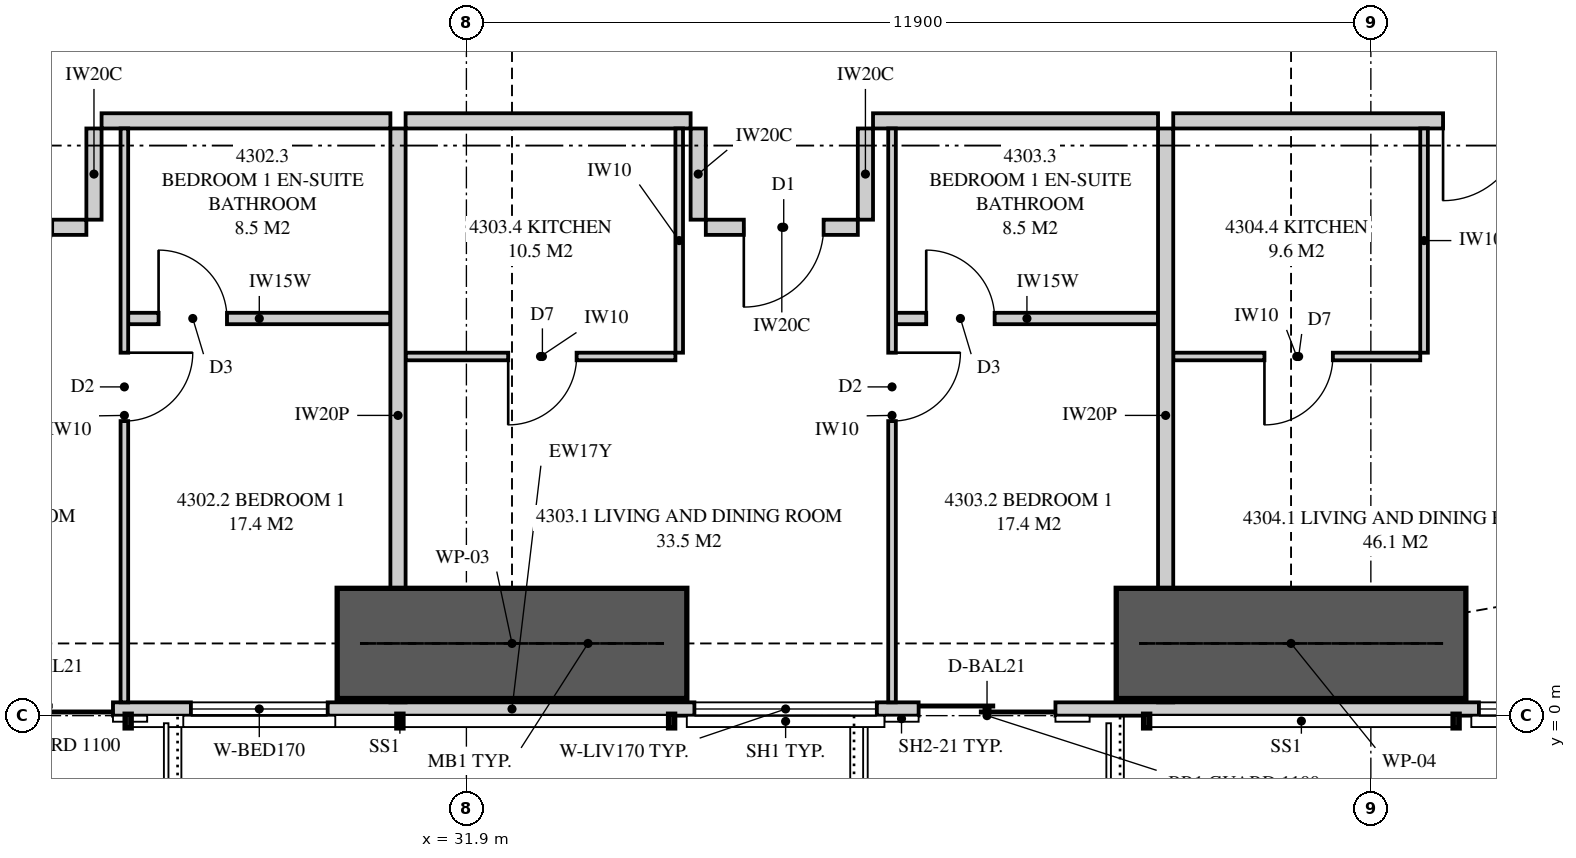
"""IFC4 building model, lengths in metres.
Left out: names, types, materials, properties, quantities, classifications, styles, units other than length and angle.
Written with IfcOpenShell. Run it as: python <this file> out.ifc"""

import sys

from ifc_helpers import new_model, si_unit, direction, frame, frame_2d, origin, place, context, subcontext, project, spatial, polyline, rectangle, outline, extrude, element, fill, save


model = new_model("IFC4")
c1 = context("Model", 3, precision=1e-05, world=origin(), true_north=direction((0.0, 1.0)))
c2 = subcontext(c1, "Body", "Model", "MODEL_VIEW")
j1 = project(units=[si_unit("LENGTHUNIT", "METRE"), si_unit("PLANEANGLEUNIT", "RADIAN")], contexts=[c1])
p1 = place(None, origin())
s1 = spatial("IfcSite", under=j1, at=p1, CompositionType="ELEMENT")
p2 = place(p1, origin())
s2 = spatial("IfcBuilding", under=s1, at=p2, CompositionType="ELEMENT")
p3 = place(p2, frame((0.0, 0.0, 161.05)))
s3 = spatial("IfcBuildingStorey", under=s2, at=p3, CompositionType="ELEMENT", Elevation=161.05)
p4 = place(p3, frame((15.051, 0.087, 0.0), z_axis=(0.0, 0.0, 1.0), x_axis=(1.0, 0.0, 0.0)))
e1 = element("IfcWall", 1, at=p4, inside=s3, PredefinedType="SOLIDWALL", context=c2, shape_type="SweptSolid", body=[
    extrude(outline(polyline([(0.0, 0.0), (34.897, 0.0), (34.897, 3.11), (27.91, 3.11), (27.91, 2.15), (27.836, 2.15), (27.836, 3.11), (27.699, 3.11), (27.699, 2.15), (7.199, 2.15), (7.199, 3.11), (7.062, 3.11), (7.062, 2.15), (6.987, 2.15), (6.987, 3.11), (0.0, 3.11), (0.0, 0.0)])), frame((0.0, 0.087, 0.0), z_axis=(0.0, -1.0, 0.0), x_axis=(1.0, 0.0, 0.0)), (0.0, 0.0, 1.0), 0.175),
])
p5 = place(p4, frame((1.625, 0.0, 0.4)))
e2 = element("IfcOpeningElement", 2, at=p5, cuts=e1, PredefinedType="OPENING", context=c2, shape_type="SweptSolid", body=[
    extrude(rectangle(XDim=2.4, YDim=1.7, at=frame_2d((1.2, 0.85))), frame((0.0, 0.097, 0.0), z_axis=(0.0, -1.0, 0.0), x_axis=(1.0, 0.0, 0.0)), (0.0, 0.0, 1.0), 0.195),
])
p6 = place(p4, frame((10.399, 0.0, 0.0)))
e3 = element("IfcOpeningElement", 3, at=p6, cuts=e1, PredefinedType="OPENING", context=c2, shape_type="SweptSolid", body=[
    extrude(rectangle(XDim=1.8, YDim=2.1, at=frame_2d((0.9, 1.05))), frame((0.0, 0.097, 0.0), z_axis=(0.0, -1.0, 0.0), x_axis=(1.0, 0.0, 0.0)), (0.0, 0.0, 1.0), 0.195),
])
p7 = place(p4, frame((13.224, 0.0, 0.4)))
e4 = element("IfcOpeningElement", 4, at=p7, cuts=e1, PredefinedType="OPENING", context=c2, shape_type="SweptSolid", body=[
    extrude(rectangle(XDim=1.8, YDim=1.7, at=frame_2d((0.9, 0.85))), frame((0.0, 0.097, 0.0), z_axis=(0.0, -1.0, 0.0), x_axis=(1.0, 0.0, 0.0)), (0.0, 0.0, 1.0), 0.195),
])
p8 = place(p4, frame((19.849, 0.0, 0.4)))
e5 = element("IfcOpeningElement", 5, at=p8, cuts=e1, PredefinedType="OPENING", context=c2, shape_type="SweptSolid", body=[
    extrude(rectangle(XDim=2.4, YDim=1.7, at=frame_2d((1.2, 0.85))), frame((0.0, 0.097, 0.0), z_axis=(0.0, -1.0, 0.0), x_axis=(1.0, 0.0, 0.0)), (0.0, 0.0, 1.0), 0.195),
])
p9 = place(p4, frame((22.799, 0.0, 0.0)))
e6 = element("IfcOpeningElement", 6, at=p9, cuts=e1, PredefinedType="OPENING", context=c2, shape_type="SweptSolid", body=[
    extrude(rectangle(XDim=1.8, YDim=2.1, at=frame_2d((0.9, 1.05))), frame((0.0, 0.097, 0.0), z_axis=(0.0, -1.0, 0.0), x_axis=(1.0, 0.0, 0.0)), (0.0, 0.0, 1.0), 0.195),
])
p10 = place(p4, frame((30.17, 0.0, 0.4)))
e7 = element("IfcOpeningElement", 7, at=p10, cuts=e1, PredefinedType="OPENING", context=c2, shape_type="SweptSolid", body=[
    extrude(rectangle(XDim=2.4, YDim=1.7, at=frame_2d((1.2, 0.85))), frame((0.0, 0.097, 0.0), z_axis=(0.0, -1.0, 0.0), x_axis=(1.0, 0.0, 0.0)), (0.0, 0.0, 1.0), 0.195),
])
p11 = place(p3, frame((31.0, 0.175, 0.0), z_axis=(0.0, 0.0, 1.0), x_axis=(0.0, 1.0, 0.0)))
e8 = element("IfcWall", 8, at=p11, inside=s3, PredefinedType="PARTITIONING", context=c2, shape_type="SweptSolid", body=[
    extrude(outline(polyline([(0.529, 2.15), (0.0, 2.15), (0.0, 0.0), (0.529, 0.0), (0.529, 0.29), (1.021, 0.29), (1.021, 0.0), (7.55, 0.0), (7.55, 3.11), (1.685, 3.11), (1.685, 2.15), (1.021, 2.15), (1.021, 1.86), (0.529, 1.86), (0.529, 2.15)])), frame((0.0, 0.1, 0.0), z_axis=(0.0, -1.0, 0.0), x_axis=(1.0, 0.0, 0.0)), (0.0, 0.0, 1.0), 0.2),
])
p12 = place(p3, frame((27.4, 0.175, 0.0), z_axis=(0.0, 0.0, 1.0), x_axis=(0.0, 1.0, 0.0)))
e9 = element("IfcWall", 9, at=p12, inside=s3, PredefinedType="PARTITIONING", context=c2, shape_type="SweptSolid", body=[
    extrude(outline(polyline([(0.0, 0.0), (7.55, 0.0), (7.55, 3.11), (1.635, 3.11), (1.635, 2.15), (0.0, 2.15), (0.0, 3.11), (0.0, 0.0)])), frame((0.0, 0.05, 0.0), z_axis=(0.0, -1.0, 0.0), x_axis=(1.0, 0.0, 0.0)), (0.0, 0.0, 1.0), 0.1),
])
p13 = place(p12, frame((3.7, 0.0, 0.0)))
e10 = element("IfcOpeningElement", 10, at=p13, cuts=e9, PredefinedType="OPENING", context=c2, shape_type="SweptSolid", body=[
    extrude(rectangle(XDim=0.9, YDim=2.1, at=frame_2d((0.45, 1.05))), frame((0.0, 0.06, 0.0), z_axis=(0.0, -1.0, 0.0), x_axis=(1.0, 0.0, 0.0)), (0.0, 0.0, 1.0), 0.12),
])
p14 = place(p3, frame((27.45, 5.225, 0.0), z_axis=(0.0, 0.0, 1.0), x_axis=(1.0, 0.0, 0.0)))
e11 = element("IfcWall", 11, at=p14, inside=s3, PredefinedType="PLUMBINGWALL", context=c2, shape_type="SweptSolid", body=[
    extrude(rectangle(XDim=3.45, YDim=0.15, at=frame_2d((1.725, 0.0))), origin(), (0.0, 0.0, 1.0), 3.11),
])
p15 = place(p14, frame((0.4, 0.0, 0.0)))
e12 = element("IfcOpeningElement", 12, at=p15, cuts=e11, PredefinedType="OPENING", context=c2, shape_type="SweptSolid", body=[
    extrude(rectangle(XDim=0.9, YDim=2.1, at=frame_2d((0.45, 1.05))), frame((0.0, 0.085, 0.0), z_axis=(0.0, -1.0, 0.0), x_axis=(1.0, 0.0, 0.0)), (0.0, 0.0, 1.0), 0.17),
])
p16 = place(p3, frame((41.1, 0.175, 0.0), z_axis=(0.0, 0.0, 1.0), x_axis=(0.0, 1.0, 0.0)))
e13 = element("IfcWall", 13, at=p16, inside=s3, PredefinedType="PARTITIONING", context=c2, shape_type="SweptSolid", body=[
    extrude(outline(polyline([(0.529, 2.15), (0.0, 2.15), (0.0, 0.0), (0.529, 0.0), (0.529, 0.165), (1.021, 0.165), (1.021, 0.0), (7.55, 0.0), (7.55, 3.11), (1.685, 3.11), (1.685, 2.15), (1.021, 2.15), (1.021, 1.985), (0.529, 1.985), (0.529, 2.15)])), frame((0.0, 0.1, 0.0), z_axis=(0.0, -1.0, 0.0), x_axis=(1.0, 0.0, 0.0)), (0.0, 0.0, 1.0), 0.2),
])
p17 = place(p3, frame((31.1, 7.825, 0.0), z_axis=(0.0, 0.0, 1.0), x_axis=(1.0, 0.0, 0.0)))
e14 = element("IfcWall", 14, at=p17, inside=s3, PredefinedType="PARTITIONING", context=c2, shape_type="SweptSolid", body=[
    extrude(outline(polyline([(0.0, 0.0), (3.75, 0.0), (3.75, 3.11), (1.737, 3.11), (1.737, 2.541), (1.062, 2.541), (1.062, 3.11), (0.0, 3.11), (0.0, 0.0)])), frame((0.0, 0.1, 0.0), z_axis=(0.0, -1.0, 0.0), x_axis=(1.0, 0.0, 0.0)), (0.0, 0.0, 1.0), 0.2),
])
p18 = place(p3, frame((37.5, 0.175, 0.0), z_axis=(0.0, 0.0, 1.0), x_axis=(0.0, 1.0, 0.0)))
e15 = element("IfcWall", 15, at=p18, inside=s3, PredefinedType="PARTITIONING", context=c2, shape_type="SweptSolid", body=[
    extrude(outline(polyline([(0.0, 0.0), (7.55, 0.0), (7.55, 3.11), (1.635, 3.11), (1.635, 2.15), (0.0, 2.15), (0.0, 3.11), (0.0, 0.0)])), frame((0.0, 0.05, 0.0), z_axis=(0.0, -1.0, 0.0), x_axis=(1.0, 0.0, 0.0)), (0.0, 0.0, 1.0), 0.1),
])
p19 = place(p18, frame((3.7, 0.0, 0.0)))
e16 = element("IfcOpeningElement", 16, at=p19, cuts=e15, PredefinedType="OPENING", context=c2, shape_type="SweptSolid", body=[
    extrude(rectangle(XDim=0.9, YDim=2.1, at=frame_2d((0.45, 1.05))), frame((0.0, 0.06, 0.0), z_axis=(0.0, -1.0, 0.0), x_axis=(1.0, 0.0, 0.0)), (0.0, 0.0, 1.0), 0.12),
])
p20 = place(p3, frame((37.55, 5.225, 0.0), z_axis=(0.0, 0.0, 1.0), x_axis=(1.0, 0.0, 0.0)))
e17 = element("IfcWall", 17, at=p20, inside=s3, PredefinedType="PLUMBINGWALL", context=c2, shape_type="SweptSolid", body=[
    extrude(rectangle(XDim=3.45, YDim=0.15, at=frame_2d((1.725, 0.0))), origin(), (0.0, 0.0, 1.0), 3.11),
])
p21 = place(p20, frame((0.4, 0.0, 0.0)))
e18 = element("IfcOpeningElement", 18, at=p21, cuts=e17, PredefinedType="OPENING", context=c2, shape_type="SweptSolid", body=[
    extrude(rectangle(XDim=0.9, YDim=2.1, at=frame_2d((0.45, 1.05))), frame((0.0, 0.085, 0.0), z_axis=(0.0, -1.0, 0.0), x_axis=(1.0, 0.0, 0.0)), (0.0, 0.0, 1.0), 0.17),
])
p22 = place(p3, frame((31.1, 4.725, 0.0), z_axis=(0.0, 0.0, 1.0), x_axis=(1.0, 0.0, 0.0)))
e19 = element("IfcWall", 19, at=p22, inside=s3, PredefinedType="PARTITIONING", context=c2, shape_type="SweptSolid", body=[
    extrude(outline(polyline([(0.0, 0.0), (3.55, 0.0), (3.55, 3.11), (1.688, 3.11), (1.688, 2.541), (1.113, 2.541), (1.113, 3.11), (0.0, 3.11), (0.0, 0.0)])), frame((0.0, 0.05, 0.0), z_axis=(0.0, -1.0, 0.0), x_axis=(1.0, 0.0, 0.0)), (0.0, 0.0, 1.0), 0.1),
])
p23 = place(p22, frame((1.35, 0.0, 0.0)))
e20 = element("IfcOpeningElement", 20, at=p23, cuts=e19, PredefinedType="OPENING", context=c2, shape_type="SweptSolid", body=[
    extrude(rectangle(XDim=0.9, YDim=2.1, at=frame_2d((0.45, 1.05))), frame((0.0, 0.06, 0.0), z_axis=(0.0, -1.0, 0.0), x_axis=(1.0, 0.0, 0.0)), (0.0, 0.0, 1.0), 0.12),
])
p24 = place(p3, frame((34.7, 4.775, 0.0), z_axis=(0.0, 0.0, 1.0), x_axis=(0.0, 1.0, 0.0)))
e21 = element("IfcWall", 21, at=p24, inside=s3, PredefinedType="PARTITIONING", context=c2, shape_type="SweptSolid", body=[
    extrude(rectangle(XDim=2.95, YDim=0.1, at=frame_2d((1.475, 0.0))), origin(), (0.0, 0.0, 1.0), 3.11),
])
p25 = place(p3, frame((41.2, 7.825, 0.0), z_axis=(0.0, 0.0, 1.0), x_axis=(1.0, 0.0, 0.0)))
e22 = element("IfcWall", 22, at=p25, inside=s3, PredefinedType="PARTITIONING", context=c2, shape_type="SweptSolid", body=[
    extrude(outline(polyline([(0.0, 0.0), (4.75, 0.0), (4.75, 3.11), (1.887, 3.11), (1.887, 2.541), (1.213, 2.541), (1.213, 3.11), (0.0, 3.11), (0.0, 0.0)])), frame((0.0, 0.1, 0.0), z_axis=(0.0, -1.0, 0.0), x_axis=(1.0, 0.0, 0.0)), (0.0, 0.0, 1.0), 0.2),
])
p26 = place(p25, frame((3.55, 0.0, 0.0)))
e23 = element("IfcOpeningElement", 23, at=p26, cuts=e22, PredefinedType="OPENING", context=c2, shape_type="SweptSolid", body=[
    extrude(rectangle(XDim=1.05, YDim=2.2, at=frame_2d((0.525, 1.1))), frame((0.0, 0.11, 0.0), z_axis=(0.0, -1.0, 0.0), x_axis=(1.0, 0.0, 0.0)), (0.0, 0.0, 1.0), 0.22),
])
p27 = place(p3, frame((41.2, 4.725, 0.0), z_axis=(0.0, 0.0, 1.0), x_axis=(1.0, 0.0, 0.0)))
e24 = element("IfcWall", 24, at=p27, inside=s3, PredefinedType="PARTITIONING", context=c2, shape_type="SweptSolid", body=[
    extrude(outline(polyline([(0.0, 0.0), (3.25, 0.0), (3.25, 3.11), (1.837, 3.11), (1.837, 2.541), (1.263, 2.541), (1.263, 3.11), (0.0, 3.11), (0.0, 0.0)])), frame((0.0, 0.05, 0.0), z_axis=(0.0, -1.0, 0.0), x_axis=(1.0, 0.0, 0.0)), (0.0, 0.0, 1.0), 0.1),
])
p28 = place(p27, frame((1.2, 0.0, 0.0)))
e25 = element("IfcOpeningElement", 25, at=p28, cuts=e24, PredefinedType="OPENING", context=c2, shape_type="SweptSolid", body=[
    extrude(rectangle(XDim=0.9, YDim=2.1, at=frame_2d((0.45, 1.05))), frame((0.0, 0.06, 0.0), z_axis=(0.0, -1.0, 0.0), x_axis=(1.0, 0.0, 0.0)), (0.0, 0.0, 1.0), 0.12),
])
p29 = place(p3, frame((44.5, 4.775, 0.0), z_axis=(0.0, 0.0, 1.0), x_axis=(0.0, 1.0, 0.0)))
e26 = element("IfcWall", 26, at=p29, inside=s3, PredefinedType="PARTITIONING", context=c2, shape_type="SweptSolid", body=[
    extrude(rectangle(XDim=2.95, YDim=0.1, at=frame_2d((1.475, 0.0))), origin(), (0.0, 0.0, 1.0), 3.11),
])
p30 = place(p3, frame((27.1, 7.825, 0.0), z_axis=(0.0, 0.0, 1.0), x_axis=(1.0, 0.0, 0.0)))
e27 = element("IfcWall", 27, at=p30, inside=s3, PredefinedType="PARTITIONING", context=c2, shape_type="SweptSolid", body=[
    extrude(rectangle(XDim=3.8, YDim=0.2, at=frame_2d((1.9, 0.0))), origin(), (0.0, 0.0, 1.0), 3.11),
])
p31 = place(p3, frame((24.9, 6.425, 0.0), z_axis=(0.0, 0.0, 1.0), x_axis=(1.0, 0.0, 0.0)))
e28 = element("IfcWall", 28, at=p31, inside=s3, PredefinedType="PARTITIONING", context=c2, shape_type="SweptSolid", body=[
    extrude(rectangle(XDim=2.0, YDim=0.2, at=frame_2d((1.0, 0.0))), origin(), (0.0, 0.0, 1.0), 3.11),
])
p32 = place(p31, frame((0.5, 0.0, 0.0)))
e29 = element("IfcOpeningElement", 29, at=p32, cuts=e28, PredefinedType="OPENING", context=c2, shape_type="SweptSolid", body=[
    extrude(rectangle(XDim=1.05, YDim=2.2, at=frame_2d((0.525, 1.1))), frame((0.0, 0.11, 0.0), z_axis=(0.0, -1.0, 0.0), x_axis=(1.0, 0.0, 0.0)), (0.0, 0.0, 1.0), 0.22),
])
p33 = place(p3, frame((27.0, 7.725, 0.0), z_axis=(0.0, 0.0, 1.0), x_axis=(0.0, -1.0, 0.0)))
e30 = element("IfcWall", 30, at=p33, inside=s3, PredefinedType="PARTITIONING", context=c2, shape_type="SweptSolid", body=[
    extrude(rectangle(XDim=1.2, YDim=0.2, at=frame_2d((0.6, 0.0))), origin(), (0.0, 0.0, 1.0), 3.11),
])
p34 = place(p3, frame((37.25, 7.825, 0.0), z_axis=(0.0, 0.0, 1.0), x_axis=(1.0, 0.0, 0.0)))
e31 = element("IfcWall", 31, at=p34, inside=s3, PredefinedType="PARTITIONING", context=c2, shape_type="SweptSolid", body=[
    extrude(rectangle(XDim=3.75, YDim=0.2, at=frame_2d((1.875, 0.0))), origin(), (0.0, 0.0, 1.0), 3.11),
])
p35 = place(p3, frame((35.05, 6.425, 0.0), z_axis=(0.0, 0.0, 1.0), x_axis=(1.0, 0.0, 0.0)))
e32 = element("IfcWall", 32, at=p35, inside=s3, PredefinedType="PARTITIONING", context=c2, shape_type="SweptSolid", body=[
    extrude(rectangle(XDim=2.0, YDim=0.2, at=frame_2d((1.0, 0.0))), origin(), (0.0, 0.0, 1.0), 3.11),
])
p36 = place(p35, frame((0.5, 0.0, 0.0)))
e33 = element("IfcOpeningElement", 33, at=p36, cuts=e32, PredefinedType="OPENING", context=c2, shape_type="SweptSolid", body=[
    extrude(rectangle(XDim=1.05, YDim=2.2, at=frame_2d((0.525, 1.1))), frame((0.0, 0.11, 0.0), z_axis=(0.0, -1.0, 0.0), x_axis=(1.0, 0.0, 0.0)), (0.0, 0.0, 1.0), 0.22),
])
for number, where, z_axis, x_axis in (
    (34, (34.95, 7.725, 0.0), (0.0, 0.0, 1.0), (0.0, -1.0, 0.0)),
    (35, (37.15, 7.725, 0.0), (0.0, 0.0, 1.0), (0.0, -1.0, 0.0)),
):
    element("IfcWall", number, at=place(p3, frame(where, z_axis=z_axis, x_axis=x_axis)), inside=s3, PredefinedType="PARTITIONING", context=c2, shape_type="SweptSolid", body=[
        extrude(rectangle(XDim=1.2, YDim=0.2, at=frame_2d((0.6, 0.0))), origin(), (0.0, 0.0, 1.0), 3.11),
    ])
for number, where, z_axis, x_axis in (
    (36, (30.2, 0.95, 0.0), (0.0, 0.0, 1.0), (1.0, 0.0, 0.0)),
    (37, (40.45, 0.95, 0.0), (0.0, 0.0, 1.0), (1.0, 0.0, 0.0)),
):
    element("IfcWall", number, at=place(p3, frame(where, z_axis=z_axis, x_axis=x_axis)), inside=s3, PredefinedType="SHEAR", context=c2, shape_type="SweptSolid", body=[
        extrude(rectangle(XDim=4.6, YDim=1.45, at=frame_2d((2.3, 0.0))), origin(), (0.0, 0.0, 1.0), 3.35),
    ])
p37 = place(p6, origin())
e38 = element("IfcDoor", 38, at=p37, inside=s3, OperationType="SLIDING_TO_LEFT", PredefinedType="DOOR", context=c2, shape_type="SweptSolid", body=[
    extrude(rectangle(XDim=1.8, YDim=2.1, at=frame_2d((0.9, 1.05))), frame((0.0, 0.025, 0.0), z_axis=(0.0, -1.0, 0.0), x_axis=(1.0, 0.0, 0.0)), (0.0, 0.0, 1.0), 0.05),
])
fill(e3, e38)
p38 = place(p7, origin())
e39 = element("IfcWindow", 39, at=p38, inside=s3, PartitioningType="SINGLE_PANEL", PredefinedType="WINDOW", context=c2, shape_type="SweptSolid", body=[
    extrude(rectangle(XDim=1.8, YDim=1.7, at=frame_2d((0.9, 0.85))), frame((0.0, 0.03, 0.0), z_axis=(0.0, -1.0, 0.0), x_axis=(1.0, 0.0, 0.0)), (0.0, 0.0, 1.0), 0.06),
])
fill(e4, e39)
p39 = place(p8, origin())
e40 = element("IfcWindow", 40, at=p39, inside=s3, PartitioningType="SINGLE_PANEL", PredefinedType="WINDOW", context=c2, shape_type="SweptSolid", body=[
    extrude(rectangle(XDim=2.4, YDim=1.7, at=frame_2d((1.2, 0.85))), frame((0.0, 0.03, 0.0), z_axis=(0.0, -1.0, 0.0), x_axis=(1.0, 0.0, 0.0)), (0.0, 0.0, 1.0), 0.06),
])
fill(e5, e40)
p40 = place(p9, origin())
e41 = element("IfcDoor", 41, at=p40, inside=s3, OperationType="SLIDING_TO_LEFT", PredefinedType="DOOR", context=c2, shape_type="SweptSolid", body=[
    extrude(rectangle(XDim=1.8, YDim=2.1, at=frame_2d((0.9, 1.05))), frame((0.0, 0.025, 0.0), z_axis=(0.0, -1.0, 0.0), x_axis=(1.0, 0.0, 0.0)), (0.0, 0.0, 1.0), 0.05),
])
fill(e6, e41)
p41 = place(p10, origin())
e42 = element("IfcWindow", 42, at=p41, inside=s3, PartitioningType="SINGLE_PANEL", PredefinedType="WINDOW", context=c2, shape_type="SweptSolid", body=[
    extrude(rectangle(XDim=2.4, YDim=1.7, at=frame_2d((1.2, 0.85))), frame((0.0, 0.03, 0.0), z_axis=(0.0, -1.0, 0.0), x_axis=(1.0, 0.0, 0.0)), (0.0, 0.0, 1.0), 0.06),
])
fill(e7, e42)
p42 = place(p32, frame((1.05, 0.0, 0.0), z_axis=(0.0, 0.0, 1.0), x_axis=(-1.0, 0.0, 0.0)))
e43 = element("IfcDoor", 43, at=p42, inside=s3, OperationType="SINGLE_SWING_RIGHT", PredefinedType="DOOR", context=c2, shape_type="SweptSolid", body=[
    extrude(rectangle(XDim=1.05, YDim=2.2, at=frame_2d((0.525, 1.1))), frame((0.0, 0.025, 0.0), z_axis=(0.0, -1.0, 0.0), x_axis=(1.0, 0.0, 0.0)), (0.0, 0.0, 1.0), 0.05),
])
fill(e29, e43)
p43 = place(p13, frame((0.9, 0.0, 0.0), z_axis=(0.0, 0.0, 1.0), x_axis=(-1.0, 0.0, 0.0)))
e44 = element("IfcDoor", 44, at=p43, inside=s3, OperationType="SINGLE_SWING_LEFT", PredefinedType="DOOR", context=c2, shape_type="SweptSolid", body=[
    extrude(rectangle(XDim=0.9, YDim=2.1, at=frame_2d((0.45, 1.05))), frame((0.0, 0.025, 0.0), z_axis=(0.0, -1.0, 0.0), x_axis=(1.0, 0.0, 0.0)), (0.0, 0.0, 1.0), 0.05),
])
fill(e10, e44)
p44 = place(p15, origin())
e45 = element("IfcDoor", 45, at=p44, inside=s3, OperationType="SINGLE_SWING_LEFT", PredefinedType="DOOR", context=c2, shape_type="SweptSolid", body=[
    extrude(rectangle(XDim=0.9, YDim=2.1, at=frame_2d((0.45, 1.05))), frame((0.0, 0.025, 0.0), z_axis=(0.0, -1.0, 0.0), x_axis=(1.0, 0.0, 0.0)), (0.0, 0.0, 1.0), 0.05),
])
fill(e12, e45)
p45 = place(p36, frame((1.05, 0.0, 0.0), z_axis=(0.0, 0.0, 1.0), x_axis=(-1.0, 0.0, 0.0)))
e46 = element("IfcDoor", 46, at=p45, inside=s3, OperationType="SINGLE_SWING_RIGHT", PredefinedType="DOOR", context=c2, shape_type="SweptSolid", body=[
    extrude(rectangle(XDim=1.05, YDim=2.2, at=frame_2d((0.525, 1.1))), frame((0.0, 0.025, 0.0), z_axis=(0.0, -1.0, 0.0), x_axis=(1.0, 0.0, 0.0)), (0.0, 0.0, 1.0), 0.05),
])
fill(e33, e46)
p46 = place(p19, frame((0.9, 0.0, 0.0), z_axis=(0.0, 0.0, 1.0), x_axis=(-1.0, 0.0, 0.0)))
e47 = element("IfcDoor", 47, at=p46, inside=s3, OperationType="SINGLE_SWING_LEFT", PredefinedType="DOOR", context=c2, shape_type="SweptSolid", body=[
    extrude(rectangle(XDim=0.9, YDim=2.1, at=frame_2d((0.45, 1.05))), frame((0.0, 0.025, 0.0), z_axis=(0.0, -1.0, 0.0), x_axis=(1.0, 0.0, 0.0)), (0.0, 0.0, 1.0), 0.05),
])
fill(e16, e47)
p47 = place(p21, origin())
e48 = element("IfcDoor", 48, at=p47, inside=s3, OperationType="SINGLE_SWING_LEFT", PredefinedType="DOOR", context=c2, shape_type="SweptSolid", body=[
    extrude(rectangle(XDim=0.9, YDim=2.1, at=frame_2d((0.45, 1.05))), frame((0.0, 0.025, 0.0), z_axis=(0.0, -1.0, 0.0), x_axis=(1.0, 0.0, 0.0)), (0.0, 0.0, 1.0), 0.05),
])
fill(e18, e48)
p48 = place(p23, frame((0.9, 0.0, 0.0), z_axis=(0.0, 0.0, 1.0), x_axis=(-1.0, 0.0, 0.0)))
e49 = element("IfcDoor", 49, at=p48, inside=s3, OperationType="SINGLE_SWING_RIGHT", PredefinedType="DOOR", context=c2, shape_type="SweptSolid", body=[
    extrude(rectangle(XDim=0.9, YDim=2.1, at=frame_2d((0.45, 1.05))), frame((0.0, 0.025, 0.0), z_axis=(0.0, -1.0, 0.0), x_axis=(1.0, 0.0, 0.0)), (0.0, 0.0, 1.0), 0.05),
])
fill(e20, e49)
p49 = place(p26, frame((1.05, 0.0, 0.0), z_axis=(0.0, 0.0, 1.0), x_axis=(-1.0, 0.0, 0.0)))
e50 = element("IfcDoor", 50, at=p49, inside=s3, OperationType="SINGLE_SWING_RIGHT", PredefinedType="DOOR", context=c2, shape_type="SweptSolid", body=[
    extrude(rectangle(XDim=1.05, YDim=2.2, at=frame_2d((0.525, 1.1))), frame((0.0, 0.025, 0.0), z_axis=(0.0, -1.0, 0.0), x_axis=(1.0, 0.0, 0.0)), (0.0, 0.0, 1.0), 0.05),
])
fill(e23, e50)
p50 = place(p28, frame((0.9, 0.0, 0.0), z_axis=(0.0, 0.0, 1.0), x_axis=(-1.0, 0.0, 0.0)))
e51 = element("IfcDoor", 51, at=p50, inside=s3, OperationType="SINGLE_SWING_RIGHT", PredefinedType="DOOR", context=c2, shape_type="SweptSolid", body=[
    extrude(rectangle(XDim=0.9, YDim=2.1, at=frame_2d((0.45, 1.05))), frame((0.0, 0.025, 0.0), z_axis=(0.0, -1.0, 0.0), x_axis=(1.0, 0.0, 0.0)), (0.0, 0.0, 1.0), 0.05),
])
fill(e25, e51)
save(model, sys.argv[1])
